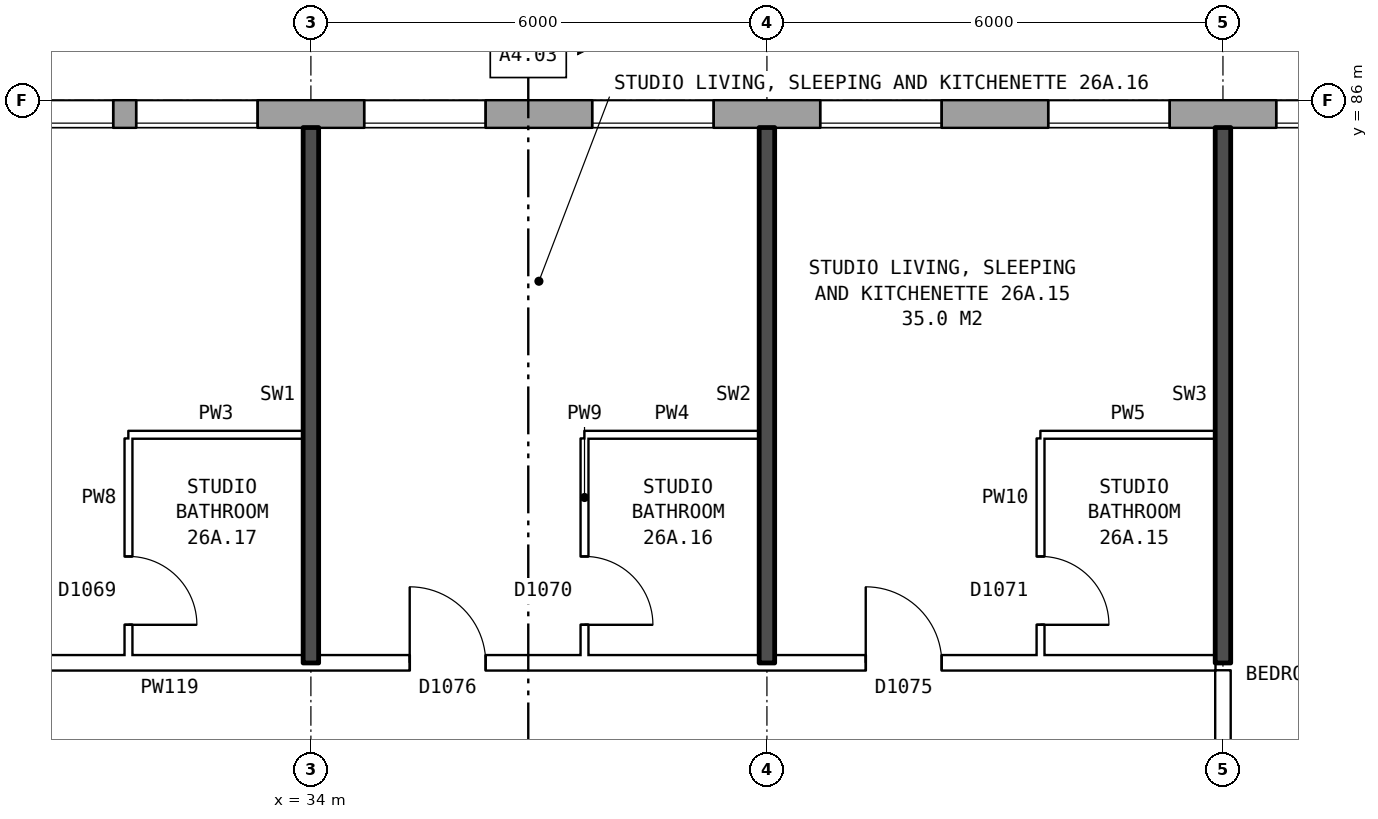
"""IFC4 building model, lengths in metres.
Left out: names, types, materials, properties, quantities, classifications, styles, units other than length and angle.
Written with IfcOpenShell. Run it as: python <this file> out.ifc"""

import sys

from ifc_helpers import new_model, si_unit, direction, frame, frame_2d, origin, place, context, subcontext, project, spatial, rectangle, extrude, element, fill, save


model = new_model("IFC4")
c1 = context("Model", 3, precision=1e-05, world=origin(), true_north=direction((0.0, 1.0)))
c2 = subcontext(c1, "Body", "Model", "MODEL_VIEW")
j1 = project(units=[si_unit("LENGTHUNIT", "METRE"), si_unit("PLANEANGLEUNIT", "RADIAN")], contexts=[c1])
p1 = place(None, origin())
s1 = spatial("IfcSite", under=j1, at=p1, CompositionType="ELEMENT")
p2 = place(p1, origin())
s2 = spatial("IfcBuilding", under=s1, at=p2, CompositionType="ELEMENT")
p3 = place(p2, frame((0.0, 0.0, 96.4)))
s3 = spatial("IfcBuildingStorey", under=s2, at=p3, CompositionType="ELEMENT", Elevation=96.4)
p4 = place(p3, frame((72.925, 85.82, 0.0), z_axis=(0.0, 0.0, 1.0), x_axis=(-1.0, 0.0, 0.0)))
e1 = element("IfcWall", 1, at=p4, inside=s3, PredefinedType="STANDARD", context=c2, shape_type="SweptSolid", body=[
    extrude(rectangle(XDim=44.851, YDim=0.36, at=frame_2d((22.425, 0.0))), origin(), (0.0, 0.0, 1.0), 2.85),
])
p5 = place(p4, frame((0.4, 0.0, 0.8)))
e2 = element("IfcOpeningElement", 2, at=p5, cuts=e1, PredefinedType="OPENING", context=c2, shape_type="SweptSolid", body=[
    extrude(rectangle(XDim=1.0, YDim=0.9, at=frame_2d((0.5, 0.45))), frame((0.0, 0.19, 0.0), z_axis=(0.0, -1.0, 0.0), x_axis=(1.0, 0.0, 0.0)), (0.0, 0.0, 1.0), 0.38),
])
p6 = place(p4, frame((3.625, 0.0, 0.8)))
e3 = element("IfcOpeningElement", 3, at=p6, cuts=e1, PredefinedType="OPENING", context=c2, shape_type="SweptSolid", body=[
    extrude(rectangle(XDim=1.6, YDim=1.8, at=frame_2d((0.8, 0.9))), frame((0.0, 0.19, 0.0), z_axis=(0.0, -1.0, 0.0), x_axis=(1.0, 0.0, 0.0)), (0.0, 0.0, 1.0), 0.38),
])
p7 = place(p4, frame((6.625, 0.0, 0.8)))
e4 = element("IfcOpeningElement", 4, at=p7, cuts=e1, PredefinedType="OPENING", context=c2, shape_type="SweptSolid", body=[
    extrude(rectangle(XDim=1.6, YDim=1.8, at=frame_2d((0.8, 0.9))), frame((0.0, 0.19, 0.0), z_axis=(0.0, -1.0, 0.0), x_axis=(1.0, 0.0, 0.0)), (0.0, 0.0, 1.0), 0.38),
])
p8 = place(p4, frame((9.625, 0.0, 0.8)))
e5 = element("IfcOpeningElement", 5, at=p8, cuts=e1, PredefinedType="OPENING", context=c2, shape_type="SweptSolid", body=[
    extrude(rectangle(XDim=1.6, YDim=1.8, at=frame_2d((0.8, 0.9))), frame((0.0, 0.19, 0.0), z_axis=(0.0, -1.0, 0.0), x_axis=(1.0, 0.0, 0.0)), (0.0, 0.0, 1.0), 0.38),
])
p9 = place(p4, frame((12.625, 0.0, 0.8)))
e6 = element("IfcOpeningElement", 6, at=p9, cuts=e1, PredefinedType="OPENING", context=c2, shape_type="SweptSolid", body=[
    extrude(rectangle(XDim=1.6, YDim=1.8, at=frame_2d((0.8, 0.9))), frame((0.0, 0.19, 0.0), z_axis=(0.0, -1.0, 0.0), x_axis=(1.0, 0.0, 0.0)), (0.0, 0.0, 1.0), 0.38),
])
p10 = place(p4, frame((15.625, 0.0, 0.8)))
e7 = element("IfcOpeningElement", 7, at=p10, cuts=e1, PredefinedType="OPENING", context=c2, shape_type="SweptSolid", body=[
    extrude(rectangle(XDim=1.6, YDim=1.8, at=frame_2d((0.8, 0.9))), frame((0.0, 0.19, 0.0), z_axis=(0.0, -1.0, 0.0), x_axis=(1.0, 0.0, 0.0)), (0.0, 0.0, 1.0), 0.38),
])
p11 = place(p4, frame((18.625, 0.0, 0.8)))
e8 = element("IfcOpeningElement", 8, at=p11, cuts=e1, PredefinedType="OPENING", context=c2, shape_type="SweptSolid", body=[
    extrude(rectangle(XDim=1.6, YDim=1.8, at=frame_2d((0.8, 0.9))), frame((0.0, 0.19, 0.0), z_axis=(0.0, -1.0, 0.0), x_axis=(1.0, 0.0, 0.0)), (0.0, 0.0, 1.0), 0.38),
])
p12 = place(p4, frame((21.625, 0.0, 0.8)))
e9 = element("IfcOpeningElement", 9, at=p12, cuts=e1, PredefinedType="OPENING", context=c2, shape_type="SweptSolid", body=[
    extrude(rectangle(XDim=1.6, YDim=1.8, at=frame_2d((0.8, 0.9))), frame((0.0, 0.19, 0.0), z_axis=(0.0, -1.0, 0.0), x_axis=(1.0, 0.0, 0.0)), (0.0, 0.0, 1.0), 0.38),
])
p13 = place(p4, frame((24.625, 0.0, 0.8)))
e10 = element("IfcOpeningElement", 10, at=p13, cuts=e1, PredefinedType="OPENING", context=c2, shape_type="SweptSolid", body=[
    extrude(rectangle(XDim=1.6, YDim=1.8, at=frame_2d((0.8, 0.9))), frame((0.0, 0.19, 0.0), z_axis=(0.0, -1.0, 0.0), x_axis=(1.0, 0.0, 0.0)), (0.0, 0.0, 1.0), 0.38),
])
p14 = place(p4, frame((27.625, 0.0, 0.8)))
e11 = element("IfcOpeningElement", 11, at=p14, cuts=e1, PredefinedType="OPENING", context=c2, shape_type="SweptSolid", body=[
    extrude(rectangle(XDim=1.6, YDim=1.8, at=frame_2d((0.8, 0.9))), frame((0.0, 0.19, 0.0), z_axis=(0.0, -1.0, 0.0), x_axis=(1.0, 0.0, 0.0)), (0.0, 0.0, 1.0), 0.38),
])
p15 = place(p4, frame((30.625, 0.0, 0.8)))
e12 = element("IfcOpeningElement", 12, at=p15, cuts=e1, PredefinedType="OPENING", context=c2, shape_type="SweptSolid", body=[
    extrude(rectangle(XDim=1.6, YDim=1.8, at=frame_2d((0.8, 0.9))), frame((0.0, 0.19, 0.0), z_axis=(0.0, -1.0, 0.0), x_axis=(1.0, 0.0, 0.0)), (0.0, 0.0, 1.0), 0.38),
])
p16 = place(p4, frame((33.625, 0.0, 0.8)))
e13 = element("IfcOpeningElement", 13, at=p16, cuts=e1, PredefinedType="OPENING", context=c2, shape_type="SweptSolid", body=[
    extrude(rectangle(XDim=1.6, YDim=1.8, at=frame_2d((0.8, 0.9))), frame((0.0, 0.19, 0.0), z_axis=(0.0, -1.0, 0.0), x_axis=(1.0, 0.0, 0.0)), (0.0, 0.0, 1.0), 0.38),
])
p17 = place(p4, frame((36.625, 0.0, 0.8)))
e14 = element("IfcOpeningElement", 14, at=p17, cuts=e1, PredefinedType="OPENING", context=c2, shape_type="SweptSolid", body=[
    extrude(rectangle(XDim=1.6, YDim=1.8, at=frame_2d((0.8, 0.9))), frame((0.0, 0.19, 0.0), z_axis=(0.0, -1.0, 0.0), x_axis=(1.0, 0.0, 0.0)), (0.0, 0.0, 1.0), 0.38),
])
p18 = place(p4, frame((39.625, 0.0, 0.8)))
e15 = element("IfcOpeningElement", 15, at=p18, cuts=e1, PredefinedType="OPENING", context=c2, shape_type="SweptSolid", body=[
    extrude(rectangle(XDim=1.6, YDim=1.8, at=frame_2d((0.8, 0.9))), frame((0.0, 0.19, 0.0), z_axis=(0.0, -1.0, 0.0), x_axis=(1.0, 0.0, 0.0)), (0.0, 0.0, 1.0), 0.38),
])
p19 = place(p4, frame((41.525, 0.0, 0.8)))
e16 = element("IfcOpeningElement", 16, at=p19, cuts=e1, PredefinedType="OPENING", context=c2, shape_type="SweptSolid", body=[
    extrude(rectangle(XDim=1.6, YDim=1.8, at=frame_2d((0.8, 0.9))), frame((0.0, 0.19, 0.0), z_axis=(0.0, -1.0, 0.0), x_axis=(1.0, 0.0, 0.0)), (0.0, 0.0, 1.0), 0.38),
])
p20 = place(p4, frame((1.7, 0.0, 0.8)))
e17 = element("IfcOpeningElement", 17, at=p20, cuts=e1, PredefinedType="OPENING", context=c2, shape_type="SweptSolid", body=[
    extrude(rectangle(XDim=1.0, YDim=1.8, at=frame_2d((0.5, 0.9))), frame((0.0, 0.19, 0.0), z_axis=(0.0, -1.0, 0.0), x_axis=(1.0, 0.0, 0.0)), (0.0, 0.0, 1.0), 0.38),
])
p21 = place(p4, frame((43.425, 0.0, 0.8)))
e18 = element("IfcOpeningElement", 18, at=p21, cuts=e1, PredefinedType="OPENING", context=c2, shape_type="SweptSolid", body=[
    extrude(rectangle(XDim=0.6, YDim=1.2, at=frame_2d((0.3, 0.6))), frame((0.0, 0.19, 0.0), z_axis=(0.0, -1.0, 0.0), x_axis=(1.0, 0.0, 0.0)), (0.0, 0.0, 1.0), 0.38),
])
p22 = place(p3, frame((25.36, 78.6, 0.0), z_axis=(0.0, 0.0, 1.0), x_axis=(1.0, 0.0, 0.0)))
e19 = element("IfcWall", 19, at=p22, inside=s3, PredefinedType="PARTITIONING", context=c2, shape_type="SweptSolid", body=[
    extrude(rectangle(XDim=20.54, YDim=0.2, at=frame_2d((10.27, 0.0))), origin(), (0.0, 0.0, 1.0), 2.85),
])
p23 = place(p22, frame((15.94, 0.0, 0.0)))
e20 = element("IfcOpeningElement", 20, at=p23, cuts=e19, PredefinedType="OPENING", context=c2, shape_type="SweptSolid", body=[
    extrude(rectangle(XDim=1.0, YDim=2.1, at=frame_2d((0.5, 1.05))), frame((0.0, 0.11, 0.0), z_axis=(0.0, -1.0, 0.0), x_axis=(1.0, 0.0, 0.0)), (0.0, 0.0, 1.0), 0.22),
])
p24 = place(p22, frame((9.94, 0.0, 0.0)))
e21 = element("IfcOpeningElement", 21, at=p24, cuts=e19, PredefinedType="OPENING", context=c2, shape_type="SweptSolid", body=[
    extrude(rectangle(XDim=1.0, YDim=2.1, at=frame_2d((0.5, 1.05))), frame((0.0, 0.11, 0.0), z_axis=(0.0, -1.0, 0.0), x_axis=(1.0, 0.0, 0.0)), (0.0, 0.0, 1.0), 0.22),
])
p25 = place(p22, frame((2.62, 0.0, 0.0)))
e22 = element("IfcOpeningElement", 22, at=p25, cuts=e19, PredefinedType="OPENING", context=c2, shape_type="SweptSolid", body=[
    extrude(rectangle(XDim=1.0, YDim=2.1, at=frame_2d((0.5, 1.05))), frame((0.0, 0.11, 0.0), z_axis=(0.0, -1.0, 0.0), x_axis=(1.0, 0.0, 0.0)), (0.0, 0.0, 1.0), 0.22),
])
for number, where, z_axis, x_axis in (
    (23, (31.6, 81.6, 0.0), (0.0, 0.0, 1.0), (1.0, 0.0, 0.0)),
    (24, (37.6, 81.6, 0.0), (0.0, 0.0, 1.0), (1.0, 0.0, 0.0)),
    (25, (43.6, 81.6, 0.0), (0.0, 0.0, 1.0), (1.0, 0.0, 0.0)),
):
    element("IfcWall", number, at=place(p3, frame(where, z_axis=z_axis, x_axis=x_axis)), inside=s3, PredefinedType="PARTITIONING", context=c2, shape_type="SweptSolid", body=[
        extrude(rectangle(XDim=2.3, YDim=0.1, at=frame_2d((1.15, 0.0))), origin(), (0.0, 0.0, 1.0), 2.85),
    ])
p26 = place(p3, frame((31.6, 78.7, 0.0), z_axis=(0.0, 0.0, 1.0), x_axis=(0.0, 1.0, 0.0)))
e26 = element("IfcWall", 26, at=p26, inside=s3, PredefinedType="PARTITIONING", context=c2, shape_type="SweptSolid", body=[
    extrude(rectangle(XDim=2.85, YDim=0.1, at=frame_2d((1.425, 0.0))), origin(), (0.0, 0.0, 1.0), 2.85),
])
p27 = place(p26, frame((0.4, 0.0, 0.0)))
e27 = element("IfcOpeningElement", 27, at=p27, cuts=e26, PredefinedType="OPENING", context=c2, shape_type="SweptSolid", body=[
    extrude(rectangle(XDim=0.9, YDim=2.1, at=frame_2d((0.45, 1.05))), frame((0.0, 0.06, 0.0), z_axis=(0.0, -1.0, 0.0), x_axis=(1.0, 0.0, 0.0)), (0.0, 0.0, 1.0), 0.12),
])
p28 = place(p3, frame((34.0, 78.6, 0.0), z_axis=(0.0, 0.0, 1.0), x_axis=(0.0, 1.0, 0.0)))
e28 = element("IfcWall", 28, at=p28, inside=s3, PredefinedType="SOLIDWALL", context=c2, shape_type="SweptSolid", body=[
    extrude(rectangle(XDim=7.04, YDim=0.2, at=frame_2d((3.52, 0.0))), origin(), (0.0, 0.0, 1.0), 2.85),
])
p29 = place(p3, frame((37.6, 78.7, 0.0), z_axis=(0.0, 0.0, 1.0), x_axis=(0.0, 1.0, 0.0)))
e29 = element("IfcWall", 29, at=p29, inside=s3, PredefinedType="PARTITIONING", context=c2, shape_type="SweptSolid", body=[
    extrude(rectangle(XDim=2.85, YDim=0.1, at=frame_2d((1.425, 0.0))), origin(), (0.0, 0.0, 1.0), 2.85),
])
p30 = place(p29, frame((0.4, 0.0, 0.0)))
e30 = element("IfcOpeningElement", 30, at=p30, cuts=e29, PredefinedType="OPENING", context=c2, shape_type="SweptSolid", body=[
    extrude(rectangle(XDim=0.9, YDim=2.1, at=frame_2d((0.45, 1.05))), frame((0.0, 0.06, 0.0), z_axis=(0.0, -1.0, 0.0), x_axis=(1.0, 0.0, 0.0)), (0.0, 0.0, 1.0), 0.12),
])
p31 = place(p3, frame((40.0, 78.6, 0.0), z_axis=(0.0, 0.0, 1.0), x_axis=(0.0, 1.0, 0.0)))
e31 = element("IfcWall", 31, at=p31, inside=s3, PredefinedType="SOLIDWALL", context=c2, shape_type="SweptSolid", body=[
    extrude(rectangle(XDim=7.04, YDim=0.2, at=frame_2d((3.52, 0.0))), origin(), (0.0, 0.0, 1.0), 2.85),
])
p32 = place(p3, frame((43.6, 78.7, 0.0), z_axis=(0.0, 0.0, 1.0), x_axis=(0.0, 1.0, 0.0)))
e32 = element("IfcWall", 32, at=p32, inside=s3, PredefinedType="PARTITIONING", context=c2, shape_type="SweptSolid", body=[
    extrude(rectangle(XDim=2.85, YDim=0.1, at=frame_2d((1.425, 0.0))), origin(), (0.0, 0.0, 1.0), 2.85),
])
p33 = place(p32, frame((0.4, 0.0, 0.0)))
e33 = element("IfcOpeningElement", 33, at=p33, cuts=e32, PredefinedType="OPENING", context=c2, shape_type="SweptSolid", body=[
    extrude(rectangle(XDim=0.9, YDim=2.1, at=frame_2d((0.45, 1.05))), frame((0.0, 0.06, 0.0), z_axis=(0.0, -1.0, 0.0), x_axis=(1.0, 0.0, 0.0)), (0.0, 0.0, 1.0), 0.12),
])
p34 = place(p3, frame((46.0, 76.3, 0.0), z_axis=(0.0, 0.0, 1.0), x_axis=(0.0, 1.0, 0.0)))
e34 = element("IfcWall", 34, at=p34, inside=s3, PredefinedType="PARTITIONING", context=c2, shape_type="SweptSolid", body=[
    extrude(rectangle(XDim=2.2, YDim=0.2, at=frame_2d((1.1, 0.0))), origin(), (0.0, 0.0, 1.0), 2.85),
])
p35 = place(p3, frame((46.0, 78.6, 0.0), z_axis=(0.0, 0.0, 1.0), x_axis=(0.0, 1.0, 0.0)))
e35 = element("IfcWall", 35, at=p35, inside=s3, PredefinedType="SOLIDWALL", context=c2, shape_type="SweptSolid", body=[
    extrude(rectangle(XDim=7.04, YDim=0.2, at=frame_2d((3.52, 0.0))), origin(), (0.0, 0.0, 1.0), 2.85),
])
p36 = place(p13, origin())
e36 = element("IfcWindow", 36, at=p36, inside=s3, PartitioningType="SINGLE_PANEL", PredefinedType="WINDOW", context=c2, shape_type="SweptSolid", body=[
    extrude(rectangle(XDim=1.6, YDim=1.8, at=frame_2d((0.8, 0.9))), frame((0.0, 0.15, 0.0), z_axis=(0.0, -1.0, 0.0), x_axis=(1.0, 0.0, 0.0)), (0.0, 0.0, 1.0), 0.06),
])
fill(e10, e36)
p37 = place(p14, origin())
e37 = element("IfcWindow", 37, at=p37, inside=s3, PartitioningType="SINGLE_PANEL", PredefinedType="WINDOW", context=c2, shape_type="SweptSolid", body=[
    extrude(rectangle(XDim=1.6, YDim=1.8, at=frame_2d((0.8, 0.9))), frame((0.0, 0.15, 0.0), z_axis=(0.0, -1.0, 0.0), x_axis=(1.0, 0.0, 0.0)), (0.0, 0.0, 1.0), 0.06),
])
fill(e11, e37)
p38 = place(p15, origin())
e38 = element("IfcWindow", 38, at=p38, inside=s3, PartitioningType="SINGLE_PANEL", PredefinedType="WINDOW", context=c2, shape_type="SweptSolid", body=[
    extrude(rectangle(XDim=1.6, YDim=1.8, at=frame_2d((0.8, 0.9))), frame((0.0, 0.15, 0.0), z_axis=(0.0, -1.0, 0.0), x_axis=(1.0, 0.0, 0.0)), (0.0, 0.0, 1.0), 0.06),
])
fill(e12, e38)
p39 = place(p16, origin())
e39 = element("IfcWindow", 39, at=p39, inside=s3, PartitioningType="SINGLE_PANEL", PredefinedType="WINDOW", context=c2, shape_type="SweptSolid", body=[
    extrude(rectangle(XDim=1.6, YDim=1.8, at=frame_2d((0.8, 0.9))), frame((0.0, 0.15, 0.0), z_axis=(0.0, -1.0, 0.0), x_axis=(1.0, 0.0, 0.0)), (0.0, 0.0, 1.0), 0.06),
])
fill(e13, e39)
p40 = place(p17, origin())
e40 = element("IfcWindow", 40, at=p40, inside=s3, PartitioningType="SINGLE_PANEL", PredefinedType="WINDOW", context=c2, shape_type="SweptSolid", body=[
    extrude(rectangle(XDim=1.6, YDim=1.8, at=frame_2d((0.8, 0.9))), frame((0.0, 0.15, 0.0), z_axis=(0.0, -1.0, 0.0), x_axis=(1.0, 0.0, 0.0)), (0.0, 0.0, 1.0), 0.06),
])
fill(e14, e40)
p41 = place(p18, origin())
e41 = element("IfcWindow", 41, at=p41, inside=s3, PartitioningType="SINGLE_PANEL", PredefinedType="WINDOW", context=c2, shape_type="SweptSolid", body=[
    extrude(rectangle(XDim=1.6, YDim=1.8, at=frame_2d((0.8, 0.9))), frame((0.0, 0.15, 0.0), z_axis=(0.0, -1.0, 0.0), x_axis=(1.0, 0.0, 0.0)), (0.0, 0.0, 1.0), 0.06),
])
fill(e15, e41)
p42 = place(p19, origin())
e42 = element("IfcWindow", 42, at=p42, inside=s3, PartitioningType="SINGLE_PANEL", PredefinedType="WINDOW", context=c2, shape_type="SweptSolid", body=[
    extrude(rectangle(XDim=1.6, YDim=1.8, at=frame_2d((0.8, 0.9))), frame((0.0, 0.15, 0.0), z_axis=(0.0, -1.0, 0.0), x_axis=(1.0, 0.0, 0.0)), (0.0, 0.0, 1.0), 0.06),
])
fill(e16, e42)
p43 = place(p23, origin())
e43 = element("IfcDoor", 43, at=p43, inside=s3, OperationType="SINGLE_SWING_LEFT", PredefinedType="DOOR", context=c2, shape_type="SweptSolid", body=[
    extrude(rectangle(XDim=1.0, YDim=2.1, at=frame_2d((0.5, 1.05))), frame((0.0, 0.025, 0.0), z_axis=(0.0, -1.0, 0.0), x_axis=(1.0, 0.0, 0.0)), (0.0, 0.0, 1.0), 0.05),
])
fill(e20, e43)
p44 = place(p33, frame((0.9, 0.0, 0.0), z_axis=(0.0, 0.0, 1.0), x_axis=(-1.0, 0.0, 0.0)))
e44 = element("IfcDoor", 44, at=p44, inside=s3, OperationType="SINGLE_SWING_RIGHT", PredefinedType="DOOR", context=c2, shape_type="SweptSolid", body=[
    extrude(rectangle(XDim=0.9, YDim=2.1, at=frame_2d((0.45, 1.05))), frame((0.0, 0.025, 0.0), z_axis=(0.0, -1.0, 0.0), x_axis=(1.0, 0.0, 0.0)), (0.0, 0.0, 1.0), 0.05),
])
fill(e33, e44)
p45 = place(p24, origin())
e45 = element("IfcDoor", 45, at=p45, inside=s3, OperationType="SINGLE_SWING_LEFT", PredefinedType="DOOR", context=c2, shape_type="SweptSolid", body=[
    extrude(rectangle(XDim=1.0, YDim=2.1, at=frame_2d((0.5, 1.05))), frame((0.0, 0.025, 0.0), z_axis=(0.0, -1.0, 0.0), x_axis=(1.0, 0.0, 0.0)), (0.0, 0.0, 1.0), 0.05),
])
fill(e21, e45)
p46 = place(p30, frame((0.9, 0.0, 0.0), z_axis=(0.0, 0.0, 1.0), x_axis=(-1.0, 0.0, 0.0)))
e46 = element("IfcDoor", 46, at=p46, inside=s3, OperationType="SINGLE_SWING_RIGHT", PredefinedType="DOOR", context=c2, shape_type="SweptSolid", body=[
    extrude(rectangle(XDim=0.9, YDim=2.1, at=frame_2d((0.45, 1.05))), frame((0.0, 0.025, 0.0), z_axis=(0.0, -1.0, 0.0), x_axis=(1.0, 0.0, 0.0)), (0.0, 0.0, 1.0), 0.05),
])
fill(e30, e46)
p47 = place(p27, frame((0.9, 0.0, 0.0), z_axis=(0.0, 0.0, 1.0), x_axis=(-1.0, 0.0, 0.0)))
e47 = element("IfcDoor", 47, at=p47, inside=s3, OperationType="SINGLE_SWING_RIGHT", PredefinedType="DOOR", context=c2, shape_type="SweptSolid", body=[
    extrude(rectangle(XDim=0.9, YDim=2.1, at=frame_2d((0.45, 1.05))), frame((0.0, 0.025, 0.0), z_axis=(0.0, -1.0, 0.0), x_axis=(1.0, 0.0, 0.0)), (0.0, 0.0, 1.0), 0.05),
])
fill(e27, e47)
save(model, sys.argv[1])
